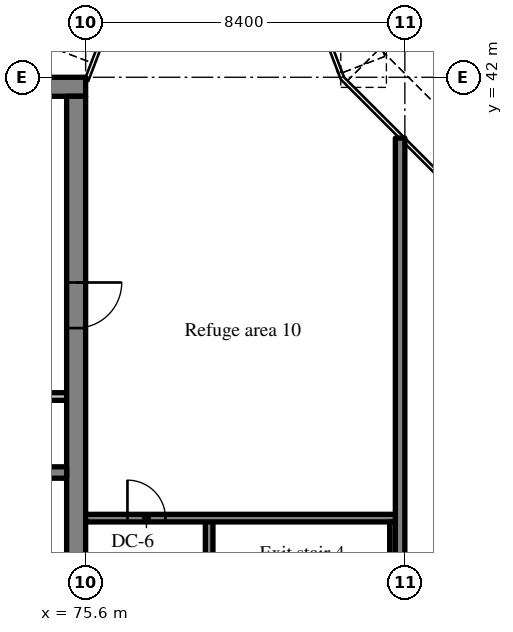
"""IFC4 building model, lengths in metres.
Left out: names, types, materials, properties, quantities, classifications, styles, units other than length and angle.
Written with IfcOpenShell. Run it as: python <this file> out.ifc"""

import sys

from ifc_helpers import new_model, si_unit, direction, frame, frame_2d, origin, place, context, subcontext, project, spatial, rectangle, extrude, source, transform, mapped, element, fill, save


model = new_model("IFC4")
c1 = context("Model", 3, precision=1e-05, world=origin(), true_north=direction((0.0, 1.0)))
c2 = subcontext(c1, "Body", "Model", "MODEL_VIEW")
j1 = project(units=[si_unit("LENGTHUNIT", "METRE"), si_unit("PLANEANGLEUNIT", "RADIAN")], contexts=[c1])
p1 = place(None, origin())
s1 = spatial("IfcSite", under=j1, at=p1, CompositionType="ELEMENT")
p2 = place(p1, origin())
s2 = spatial("IfcBuilding", under=s1, at=p2, CompositionType="ELEMENT")
p3 = place(p2, frame((0.0, 0.0, 270.1)))
s3 = spatial("IfcBuildingStorey", under=s2, at=p3, CompositionType="ELEMENT", Elevation=270.1)
m1 = source(origin(), c2, "Body", "SweptSolid", [
    extrude(rectangle(XDim=50.4, YDim=0.5, at=frame_2d((25.2, 0.0))), origin(), (0.0, 0.0, 1.0), 7.32),
])
p4 = place(p3, frame((25.2, 41.75, 0.0), z_axis=(0.0, 0.0, 1.0), x_axis=(1.0, 0.0, 0.0)))
e1 = element("IfcWall", 1, at=p4, inside=s3, PredefinedType="SHEAR", context=c2, shape_type="MappedRepresentation", body=[
    mapped(m1, transform((0.0, 0.0, 0.0), scale=1.0)),
])
m2 = source(origin(), c2, "Body", "SweptSolid", [
    extrude(rectangle(XDim=19.0, YDim=0.5, at=frame_2d((9.5, 0.0))), origin(), (0.0, 0.0, 1.0), 7.32),
])
p5 = place(p3, frame((75.35, 22.5, 0.0), z_axis=(0.0, 0.0, 1.0), x_axis=(0.0, 1.0, 0.0)))
e2 = element("IfcWall", 2, at=p5, inside=s3, PredefinedType="SHEAR", context=c2, shape_type="MappedRepresentation", body=[
    mapped(m2, transform((0.0, 0.0, 0.0), scale=1.0)),
])
m3 = source(origin(), c2, "Body", "SweptSolid", [
    extrude(rectangle(XDim=1.0, YDim=2.1, at=frame_2d((0.5, 1.05))), frame((0.0, 0.26, 0.0), z_axis=(0.0, -1.0, 0.0), x_axis=(1.0, 0.0, 0.0)), (0.0, 0.0, 1.0), 0.52),
])
p6 = place(p5, frame((3.0, 0.0, 0.0)))
e3 = element("IfcOpeningElement", 3, at=p6, cuts=e2, PredefinedType="OPENING", context=c2, shape_type="MappedRepresentation", body=[
    mapped(m3, transform((0.0, 0.0, 0.0), scale=1.0)),
])
m4 = source(origin(), c2, "Body", "SweptSolid", [
    extrude(rectangle(XDim=1.2, YDim=2.1, at=frame_2d((0.6, 1.05))), frame((0.0, 0.26, 0.0), z_axis=(0.0, -1.0, 0.0), x_axis=(1.0, 0.0, 0.0)), (0.0, 0.0, 1.0), 0.52),
])
p7 = place(p5, frame((12.9, 0.0, 0.0)))
e4 = element("IfcOpeningElement", 4, at=p7, cuts=e2, PredefinedType="OPENING", context=c2, shape_type="MappedRepresentation", body=[
    mapped(m4, transform((0.0, 0.0, 0.0), scale=1.0)),
])
m5 = source(origin(), c2, "Body", "SweptSolid", [
    extrude(rectangle(XDim=7.75, YDim=0.3, at=frame_2d((3.875, 0.0))), origin(), (0.0, 0.0, 1.0), 7.32),
])
p8 = place(p3, frame((67.35, 31.6, 0.0), z_axis=(0.0, 0.0, 1.0), x_axis=(1.0, 0.0, 0.0)))
e5 = element("IfcWall", 5, at=p8, inside=s3, PredefinedType="SHEAR", context=c2, shape_type="MappedRepresentation", body=[
    mapped(m5, transform((0.0, 0.0, 0.0), scale=1.0)),
])
m6 = source(origin(), c2, "Body", "SweptSolid", [
    extrude(rectangle(XDim=1.1, YDim=2.1, at=frame_2d((0.55, 1.05))), frame((0.0, 0.16, 0.0), z_axis=(0.0, -1.0, 0.0), x_axis=(1.0, 0.0, 0.0)), (0.0, 0.0, 1.0), 0.32),
])
p9 = place(p8, frame((5.875, 0.0, 0.0)))
e6 = element("IfcOpeningElement", 6, at=p9, cuts=e5, PredefinedType="OPENING", context=c2, shape_type="MappedRepresentation", body=[
    mapped(m6, transform((0.0, 0.0, 0.0), scale=1.0)),
])
m7 = source(origin(), c2, "Body", "SweptSolid", [
    extrude(rectangle(XDim=18.4, YDim=0.25, at=frame_2d((9.2, 0.0))), origin(), (0.0, 0.0, 1.0), 7.32),
])
p10 = place(p3, frame((83.875, 22.0, 0.0), z_axis=(0.0, 0.0, 1.0), x_axis=(0.0, 1.0, 0.0)))
e7 = element("IfcWall", 7, at=p10, inside=s3, PredefinedType="SHEAR", context=c2, shape_type="MappedRepresentation", body=[
    mapped(m7, transform((0.0, 0.0, 0.0), scale=1.0)),
])
m8 = source(origin(), c2, "Body", "SweptSolid", [
    extrude(rectangle(XDim=2.65, YDim=0.2, at=frame_2d((1.325, 0.0))), origin(), (0.0, 0.0, 1.0), 7.32),
])
p11 = place(p3, frame((72.45, 33.6, 0.0), z_axis=(0.0, 0.0, 1.0), x_axis=(1.0, 0.0, 0.0)))
e8 = element("IfcWall", 8, at=p11, inside=s3, PredefinedType="SOLIDWALL", context=c2, shape_type="MappedRepresentation", body=[
    mapped(m8, transform((0.0, 0.0, 0.0), scale=1.0)),
])
m9 = source(origin(), c2, "Body", "SweptSolid", [
    extrude(rectangle(XDim=8.3, YDim=0.2, at=frame_2d((4.15, 0.0))), origin(), (0.0, 0.0, 1.0), 7.32),
])
p12 = place(p3, frame((78.85, 22.1, 0.0), z_axis=(0.0, 0.0, 1.0), x_axis=(0.0, 1.0, 0.0)))
e9 = element("IfcWall", 9, at=p12, inside=s3, PredefinedType="SOLIDWALL", context=c2, shape_type="MappedRepresentation", body=[
    mapped(m9, transform((0.0, 0.0, 0.0), scale=1.0)),
])
m10 = source(origin(), c2, "Body", "SweptSolid", [
    extrude(rectangle(XDim=1.2, YDim=2.1, at=frame_2d((0.6, 1.05))), frame((0.0, 0.11, 0.0), z_axis=(0.0, -1.0, 0.0), x_axis=(1.0, 0.0, 0.0)), (0.0, 0.0, 1.0), 0.22),
])
p13 = place(p12, frame((0.6, 0.0, 0.0)))
e10 = element("IfcOpeningElement", 10, at=p13, cuts=e9, PredefinedType="OPENING", context=c2, shape_type="MappedRepresentation", body=[
    mapped(m10, transform((0.0, 0.0, 0.0), scale=1.0)),
])
m11 = source(origin(), c2, "Body", "SweptSolid", [
    extrude(rectangle(XDim=8.15, YDim=0.2, at=frame_2d((4.075, 0.0))), origin(), (0.0, 0.0, 1.0), 7.32),
])
p14 = place(p3, frame((83.75, 30.4, 0.0), z_axis=(0.0, 0.0, 1.0), x_axis=(-1.0, 0.0, 0.0)))
e11 = element("IfcWall", 11, at=p14, inside=s3, PredefinedType="SOLIDWALL", context=c2, shape_type="MappedRepresentation", body=[
    mapped(m11, transform((0.0, 0.0, 0.0), scale=1.0)),
])
m12 = source(origin(), c2, "Body", "SweptSolid", [
    extrude(rectangle(XDim=1.0, YDim=2.1, at=frame_2d((0.5, 1.05))), frame((0.0, 0.11, 0.0), z_axis=(0.0, -1.0, 0.0), x_axis=(1.0, 0.0, 0.0)), (0.0, 0.0, 1.0), 0.22),
])
p15 = place(p14, frame((6.05, 0.0, 0.0)))
e12 = element("IfcOpeningElement", 12, at=p15, cuts=e11, PredefinedType="OPENING", context=c2, shape_type="MappedRepresentation", body=[
    mapped(m12, transform((0.0, 0.0, 0.0), scale=1.0)),
])
m13 = source(origin(), c2, "Body", "SweptSolid", [
    extrude(rectangle(XDim=8.1, YDim=0.15, at=frame_2d((4.05, 0.0))), origin(), (0.0, 0.0, 1.0), 7.32),
])
p16 = place(p3, frame((83.675, 22.2, 0.0), z_axis=(0.0, 0.0, 1.0), x_axis=(0.0, 1.0, 0.0)))
e13 = element("IfcWall", 13, at=p16, inside=s3, PredefinedType="SOLIDWALL", context=c2, shape_type="MappedRepresentation", body=[
    mapped(m13, transform((0.0, 0.0, 0.0), scale=1.0)),
])
m14 = source(origin(), c2, "Body", "SweptSolid", [
    extrude(rectangle(XDim=1.2, YDim=2.1, at=frame_2d((0.6, 1.05))), frame((0.0, 0.025, 0.0), z_axis=(0.0, -1.0, 0.0), x_axis=(1.0, 0.0, 0.0)), (0.0, 0.0, 1.0), 0.05),
])
p17 = place(p7, origin())
e14 = element("IfcDoor", 14, at=p17, inside=s3, OperationType="SINGLE_SWING_RIGHT", PredefinedType="DOOR", context=c2, shape_type="MappedRepresentation", body=[
    mapped(m14, transform((0.0, 0.0, 0.0), scale=1.0)),
])
fill(e4, e14)
m15 = source(origin(), c2, "Body", "SweptSolid", [
    extrude(rectangle(XDim=1.0, YDim=2.1, at=frame_2d((0.5, 1.05))), frame((0.0, 0.025, 0.0), z_axis=(0.0, -1.0, 0.0), x_axis=(1.0, 0.0, 0.0)), (0.0, 0.0, 1.0), 0.05),
])
p18 = place(p15, origin())
e15 = element("IfcDoor", 15, at=p18, inside=s3, OperationType="SINGLE_SWING_RIGHT", PredefinedType="DOOR", context=c2, shape_type="MappedRepresentation", body=[
    mapped(m15, transform((0.0, 0.0, 0.0), scale=1.0)),
])
fill(e12, e15)
save(model, sys.argv[1])
